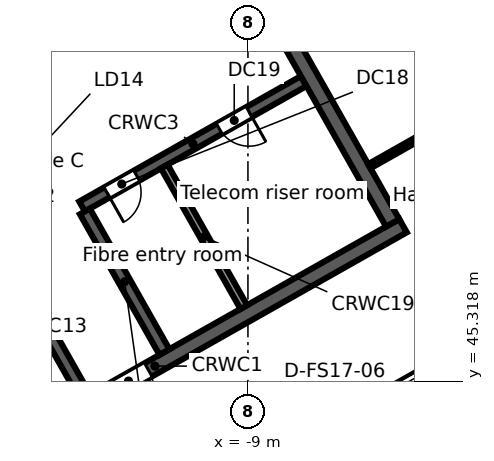
"""IFC4 building model, lengths in metres.
Left out: names, types, materials, properties, quantities, classifications, styles, units other than length and angle.
Written with IfcOpenShell. Run it as: python <this file> out.ifc"""

import sys

from ifc_helpers import new_model, si_unit, direction, frame, frame_2d, origin, place, context, subcontext, project, spatial, rectangle, extrude, element, fill, save


model = new_model("IFC4")
c1 = context("Model", 3, precision=1e-05, world=origin(), true_north=direction((0.0, 1.0)))
c2 = subcontext(c1, "Body", "Model", "MODEL_VIEW")
j1 = project(units=[si_unit("LENGTHUNIT", "METRE"), si_unit("PLANEANGLEUNIT", "RADIAN")], contexts=[c1])
p1 = place(None, origin())
s1 = spatial("IfcSite", under=j1, at=p1, CompositionType="ELEMENT")
p2 = place(p1, origin())
s2 = spatial("IfcBuilding", under=s1, at=p2, CompositionType="ELEMENT")
p3 = place(p2, frame((0.0, 0.0, 262.7)))
s3 = spatial("IfcBuildingStorey", under=s2, at=p3, CompositionType="ELEMENT", Elevation=262.7)
p4 = place(p3, frame((-58.732, 38.771, 0.0), z_axis=(0.0, 0.0, 1.0), x_axis=(0.870355615581, 0.492423702137, 0.0)))
e1 = element("IfcWall", 1, at=p4, inside=s3, PredefinedType="STANDARD", context=c2, shape_type="SweptSolid", body=[
    extrude(rectangle(XDim=64.052, YDim=0.25, at=frame_2d((32.026, 0.0))), origin(), (0.0, 0.0, 1.0), 3.52),
])
p5 = place(p4, frame((61.259, 0.0, 0.8)))
e2 = element("IfcOpeningElement", 2, at=p5, cuts=e1, PredefinedType="OPENING", context=c2, shape_type="SweptSolid", body=[
    extrude(rectangle(XDim=2.4, YDim=2.2, at=frame_2d((1.2, 1.1))), frame((0.0, 0.135, 0.0), z_axis=(0.0, -1.0, 0.0), x_axis=(1.0, 0.0, 0.0)), (0.0, 0.0, 1.0), 0.27),
])
p6 = place(p4, frame((58.216, 0.0, 0.8)))
e3 = element("IfcOpeningElement", 3, at=p6, cuts=e1, PredefinedType="OPENING", context=c2, shape_type="SweptSolid", body=[
    extrude(rectangle(XDim=2.4, YDim=2.2, at=frame_2d((1.2, 1.1))), frame((0.0, 0.135, 0.0), z_axis=(0.0, -1.0, 0.0), x_axis=(1.0, 0.0, 0.0)), (0.0, 0.0, 1.0), 0.27),
])
p7 = place(p4, frame((55.173, 0.0, 0.8)))
e4 = element("IfcOpeningElement", 4, at=p7, cuts=e1, PredefinedType="OPENING", context=c2, shape_type="SweptSolid", body=[
    extrude(rectangle(XDim=2.4, YDim=2.2, at=frame_2d((1.2, 1.1))), frame((0.0, 0.135, 0.0), z_axis=(0.0, -1.0, 0.0), x_axis=(1.0, 0.0, 0.0)), (0.0, 0.0, 1.0), 0.27),
])
p8 = place(p4, frame((52.129, 0.0, 0.8)))
e5 = element("IfcOpeningElement", 5, at=p8, cuts=e1, PredefinedType="OPENING", context=c2, shape_type="SweptSolid", body=[
    extrude(rectangle(XDim=2.4, YDim=2.2, at=frame_2d((1.2, 1.1))), frame((0.0, 0.135, 0.0), z_axis=(0.0, -1.0, 0.0), x_axis=(1.0, 0.0, 0.0)), (0.0, 0.0, 1.0), 0.27),
])
p9 = place(p4, frame((49.086, 0.0, 0.8)))
e6 = element("IfcOpeningElement", 6, at=p9, cuts=e1, PredefinedType="OPENING", context=c2, shape_type="SweptSolid", body=[
    extrude(rectangle(XDim=2.4, YDim=2.2, at=frame_2d((1.2, 1.1))), frame((0.0, 0.135, 0.0), z_axis=(0.0, -1.0, 0.0), x_axis=(1.0, 0.0, 0.0)), (0.0, 0.0, 1.0), 0.27),
])
p10 = place(p4, frame((46.043, 0.0, 0.8)))
e7 = element("IfcOpeningElement", 7, at=p10, cuts=e1, PredefinedType="OPENING", context=c2, shape_type="SweptSolid", body=[
    extrude(rectangle(XDim=2.4, YDim=2.2, at=frame_2d((1.2, 1.1))), frame((0.0, 0.135, 0.0), z_axis=(0.0, -1.0, 0.0), x_axis=(1.0, 0.0, 0.0)), (0.0, 0.0, 1.0), 0.27),
])
p11 = place(p4, frame((43.0, 0.0, 0.8)))
e8 = element("IfcOpeningElement", 8, at=p11, cuts=e1, PredefinedType="OPENING", context=c2, shape_type="SweptSolid", body=[
    extrude(rectangle(XDim=2.4, YDim=2.2, at=frame_2d((1.2, 1.1))), frame((0.0, 0.135, 0.0), z_axis=(0.0, -1.0, 0.0), x_axis=(1.0, 0.0, 0.0)), (0.0, 0.0, 1.0), 0.27),
])
p12 = place(p4, frame((39.956, 0.0, 0.8)))
e9 = element("IfcOpeningElement", 9, at=p12, cuts=e1, PredefinedType="OPENING", context=c2, shape_type="SweptSolid", body=[
    extrude(rectangle(XDim=2.4, YDim=2.2, at=frame_2d((1.2, 1.1))), frame((0.0, 0.135, 0.0), z_axis=(0.0, -1.0, 0.0), x_axis=(1.0, 0.0, 0.0)), (0.0, 0.0, 1.0), 0.27),
])
p13 = place(p4, frame((36.913, 0.0, 0.8)))
e10 = element("IfcOpeningElement", 10, at=p13, cuts=e1, PredefinedType="OPENING", context=c2, shape_type="SweptSolid", body=[
    extrude(rectangle(XDim=2.4, YDim=2.2, at=frame_2d((1.2, 1.1))), frame((0.0, 0.135, 0.0), z_axis=(0.0, -1.0, 0.0), x_axis=(1.0, 0.0, 0.0)), (0.0, 0.0, 1.0), 0.27),
])
p14 = place(p4, frame((33.87, 0.0, 0.8)))
e11 = element("IfcOpeningElement", 11, at=p14, cuts=e1, PredefinedType="OPENING", context=c2, shape_type="SweptSolid", body=[
    extrude(rectangle(XDim=2.4, YDim=2.2, at=frame_2d((1.2, 1.1))), frame((0.0, 0.135, 0.0), z_axis=(0.0, -1.0, 0.0), x_axis=(1.0, 0.0, 0.0)), (0.0, 0.0, 1.0), 0.27),
])
p15 = place(p4, frame((30.826, 0.0, 0.8)))
e12 = element("IfcOpeningElement", 12, at=p15, cuts=e1, PredefinedType="OPENING", context=c2, shape_type="SweptSolid", body=[
    extrude(rectangle(XDim=2.4, YDim=2.2, at=frame_2d((1.2, 1.1))), frame((0.0, 0.135, 0.0), z_axis=(0.0, -1.0, 0.0), x_axis=(1.0, 0.0, 0.0)), (0.0, 0.0, 1.0), 0.27),
])
p16 = place(p4, frame((27.783, 0.0, 0.8)))
e13 = element("IfcOpeningElement", 13, at=p16, cuts=e1, PredefinedType="OPENING", context=c2, shape_type="SweptSolid", body=[
    extrude(rectangle(XDim=2.4, YDim=2.2, at=frame_2d((1.2, 1.1))), frame((0.0, 0.135, 0.0), z_axis=(0.0, -1.0, 0.0), x_axis=(1.0, 0.0, 0.0)), (0.0, 0.0, 1.0), 0.27),
])
p17 = place(p4, frame((24.74, 0.0, 0.8)))
e14 = element("IfcOpeningElement", 14, at=p17, cuts=e1, PredefinedType="OPENING", context=c2, shape_type="SweptSolid", body=[
    extrude(rectangle(XDim=2.4, YDim=2.2, at=frame_2d((1.2, 1.1))), frame((0.0, 0.135, 0.0), z_axis=(0.0, -1.0, 0.0), x_axis=(1.0, 0.0, 0.0)), (0.0, 0.0, 1.0), 0.27),
])
p18 = place(p4, frame((21.696, 0.0, 0.8)))
e15 = element("IfcOpeningElement", 15, at=p18, cuts=e1, PredefinedType="OPENING", context=c2, shape_type="SweptSolid", body=[
    extrude(rectangle(XDim=2.4, YDim=2.2, at=frame_2d((1.2, 1.1))), frame((0.0, 0.135, 0.0), z_axis=(0.0, -1.0, 0.0), x_axis=(1.0, 0.0, 0.0)), (0.0, 0.0, 1.0), 0.27),
])
p19 = place(p4, frame((18.653, 0.0, 0.8)))
e16 = element("IfcOpeningElement", 16, at=p19, cuts=e1, PredefinedType="OPENING", context=c2, shape_type="SweptSolid", body=[
    extrude(rectangle(XDim=2.4, YDim=2.2, at=frame_2d((1.2, 1.1))), frame((0.0, 0.135, 0.0), z_axis=(0.0, -1.0, 0.0), x_axis=(1.0, 0.0, 0.0)), (0.0, 0.0, 1.0), 0.27),
])
p20 = place(p4, frame((15.61, 0.0, 0.8)))
e17 = element("IfcOpeningElement", 17, at=p20, cuts=e1, PredefinedType="OPENING", context=c2, shape_type="SweptSolid", body=[
    extrude(rectangle(XDim=2.4, YDim=2.2, at=frame_2d((1.2, 1.1))), frame((0.0, 0.135, 0.0), z_axis=(0.0, -1.0, 0.0), x_axis=(1.0, 0.0, 0.0)), (0.0, 0.0, 1.0), 0.27),
])
p21 = place(p4, frame((12.567, 0.0, 0.8)))
e18 = element("IfcOpeningElement", 18, at=p21, cuts=e1, PredefinedType="OPENING", context=c2, shape_type="SweptSolid", body=[
    extrude(rectangle(XDim=2.4, YDim=2.2, at=frame_2d((1.2, 1.1))), frame((0.0, 0.135, 0.0), z_axis=(0.0, -1.0, 0.0), x_axis=(1.0, 0.0, 0.0)), (0.0, 0.0, 1.0), 0.27),
])
p22 = place(p4, frame((9.523, 0.0, 0.8)))
e19 = element("IfcOpeningElement", 19, at=p22, cuts=e1, PredefinedType="OPENING", context=c2, shape_type="SweptSolid", body=[
    extrude(rectangle(XDim=2.4, YDim=2.2, at=frame_2d((1.2, 1.1))), frame((0.0, 0.135, 0.0), z_axis=(0.0, -1.0, 0.0), x_axis=(1.0, 0.0, 0.0)), (0.0, 0.0, 1.0), 0.27),
])
p23 = place(p4, frame((6.48, 0.0, 0.8)))
e20 = element("IfcOpeningElement", 20, at=p23, cuts=e1, PredefinedType="OPENING", context=c2, shape_type="SweptSolid", body=[
    extrude(rectangle(XDim=2.4, YDim=2.2, at=frame_2d((1.2, 1.1))), frame((0.0, 0.135, 0.0), z_axis=(0.0, -1.0, 0.0), x_axis=(1.0, 0.0, 0.0)), (0.0, 0.0, 1.0), 0.27),
])
p24 = place(p4, frame((3.437, 0.0, 0.8)))
e21 = element("IfcOpeningElement", 21, at=p24, cuts=e1, PredefinedType="OPENING", context=c2, shape_type="SweptSolid", body=[
    extrude(rectangle(XDim=2.4, YDim=2.2, at=frame_2d((1.2, 1.1))), frame((0.0, 0.135, 0.0), z_axis=(0.0, -1.0, 0.0), x_axis=(1.0, 0.0, 0.0)), (0.0, 0.0, 1.0), 0.27),
])
p25 = place(p4, frame((0.393, 0.0, 0.8)))
e22 = element("IfcOpeningElement", 22, at=p25, cuts=e1, PredefinedType="OPENING", context=c2, shape_type="SweptSolid", body=[
    extrude(rectangle(XDim=2.4, YDim=2.2, at=frame_2d((1.2, 1.1))), frame((0.0, 0.135, 0.0), z_axis=(0.0, -1.0, 0.0), x_axis=(1.0, 0.0, 0.0)), (0.0, 0.0, 1.0), 0.27),
])
p26 = place(p3, frame((-3.017, 46.293, 0.0), z_axis=(0.0, 0.0, 1.0), x_axis=(-0.870355474887, -0.492423950812, 0.0)))
e23 = element("IfcWall", 23, at=p26, inside=s3, PredefinedType="STANDARD", context=c2, shape_type="SweptSolid", body=[
    extrude(rectangle(XDim=40.34, YDim=0.25, at=frame_2d((20.17, 0.0))), origin(), (0.0, 0.0, 1.0), 3.52),
])
p27 = place(p26, frame((37.428, 0.0, 0.8)))
e24 = element("IfcOpeningElement", 24, at=p27, cuts=e23, PredefinedType="OPENING", context=c2, shape_type="SweptSolid", body=[
    extrude(rectangle(XDim=2.4, YDim=2.2, at=frame_2d((1.2, 1.1))), frame((0.0, 0.135, 0.0), z_axis=(0.0, -1.0, 0.0), x_axis=(1.0, 0.0, 0.0)), (0.0, 0.0, 1.0), 0.27),
])
p28 = place(p26, frame((34.372, 0.0, 0.0)))
e25 = element("IfcOpeningElement", 25, at=p28, cuts=e23, PredefinedType="OPENING", context=c2, shape_type="SweptSolid", body=[
    extrude(rectangle(XDim=1.8, YDim=2.4, at=frame_2d((0.9, 1.2))), frame((0.0, 0.135, 0.0), z_axis=(0.0, -1.0, 0.0), x_axis=(1.0, 0.0, 0.0)), (0.0, 0.0, 1.0), 0.27),
])
p29 = place(p26, frame((30.716, 0.0, 0.8)))
e26 = element("IfcOpeningElement", 26, at=p29, cuts=e23, PredefinedType="OPENING", context=c2, shape_type="SweptSolid", body=[
    extrude(rectangle(XDim=2.4, YDim=2.2, at=frame_2d((1.2, 1.1))), frame((0.0, 0.135, 0.0), z_axis=(0.0, -1.0, 0.0), x_axis=(1.0, 0.0, 0.0)), (0.0, 0.0, 1.0), 0.27),
])
p30 = place(p26, frame((27.36, 0.0, 0.8)))
e27 = element("IfcOpeningElement", 27, at=p30, cuts=e23, PredefinedType="OPENING", context=c2, shape_type="SweptSolid", body=[
    extrude(rectangle(XDim=2.4, YDim=2.2, at=frame_2d((1.2, 1.1))), frame((0.0, 0.135, 0.0), z_axis=(0.0, -1.0, 0.0), x_axis=(1.0, 0.0, 0.0)), (0.0, 0.0, 1.0), 0.27),
])
p31 = place(p26, frame((24.304, 0.0, 0.0)))
e28 = element("IfcOpeningElement", 28, at=p31, cuts=e23, PredefinedType="OPENING", context=c2, shape_type="SweptSolid", body=[
    extrude(rectangle(XDim=1.8, YDim=2.4, at=frame_2d((0.9, 1.2))), frame((0.0, 0.135, 0.0), z_axis=(0.0, -1.0, 0.0), x_axis=(1.0, 0.0, 0.0)), (0.0, 0.0, 1.0), 0.27),
])
p32 = place(p26, frame((20.648, 0.0, 0.8)))
e29 = element("IfcOpeningElement", 29, at=p32, cuts=e23, PredefinedType="OPENING", context=c2, shape_type="SweptSolid", body=[
    extrude(rectangle(XDim=2.4, YDim=2.2, at=frame_2d((1.2, 1.1))), frame((0.0, 0.135, 0.0), z_axis=(0.0, -1.0, 0.0), x_axis=(1.0, 0.0, 0.0)), (0.0, 0.0, 1.0), 0.27),
])
p33 = place(p26, frame((17.292, 0.0, 0.8)))
e30 = element("IfcOpeningElement", 30, at=p33, cuts=e23, PredefinedType="OPENING", context=c2, shape_type="SweptSolid", body=[
    extrude(rectangle(XDim=2.4, YDim=2.2, at=frame_2d((1.2, 1.1))), frame((0.0, 0.135, 0.0), z_axis=(0.0, -1.0, 0.0), x_axis=(1.0, 0.0, 0.0)), (0.0, 0.0, 1.0), 0.27),
])
p34 = place(p26, frame((14.236, 0.0, 0.0)))
e31 = element("IfcOpeningElement", 31, at=p34, cuts=e23, PredefinedType="OPENING", context=c2, shape_type="SweptSolid", body=[
    extrude(rectangle(XDim=1.8, YDim=2.4, at=frame_2d((0.9, 1.2))), frame((0.0, 0.135, 0.0), z_axis=(0.0, -1.0, 0.0), x_axis=(1.0, 0.0, 0.0)), (0.0, 0.0, 1.0), 0.27),
])
p35 = place(p26, frame((10.58, 0.0, 0.8)))
e32 = element("IfcOpeningElement", 32, at=p35, cuts=e23, PredefinedType="OPENING", context=c2, shape_type="SweptSolid", body=[
    extrude(rectangle(XDim=2.4, YDim=2.2, at=frame_2d((1.2, 1.1))), frame((0.0, 0.135, 0.0), z_axis=(0.0, -1.0, 0.0), x_axis=(1.0, 0.0, 0.0)), (0.0, 0.0, 1.0), 0.27),
])
p36 = place(p26, frame((7.224, 0.0, 0.8)))
e33 = element("IfcOpeningElement", 33, at=p36, cuts=e23, PredefinedType="OPENING", context=c2, shape_type="SweptSolid", body=[
    extrude(rectangle(XDim=2.4, YDim=2.2, at=frame_2d((1.2, 1.1))), frame((0.0, 0.135, 0.0), z_axis=(0.0, -1.0, 0.0), x_axis=(1.0, 0.0, 0.0)), (0.0, 0.0, 1.0), 0.27),
])
p37 = place(p26, frame((4.168, 0.0, 0.0)))
e34 = element("IfcOpeningElement", 34, at=p37, cuts=e23, PredefinedType="OPENING", context=c2, shape_type="SweptSolid", body=[
    extrude(rectangle(XDim=1.8, YDim=2.4, at=frame_2d((0.9, 1.2))), frame((0.0, 0.135, 0.0), z_axis=(0.0, -1.0, 0.0), x_axis=(1.0, 0.0, 0.0)), (0.0, 0.0, 1.0), 0.27),
])
p38 = place(p26, frame((0.512, 0.0, 0.8)))
e35 = element("IfcOpeningElement", 35, at=p38, cuts=e23, PredefinedType="OPENING", context=c2, shape_type="SweptSolid", body=[
    extrude(rectangle(XDim=2.4, YDim=2.2, at=frame_2d((1.2, 1.1))), frame((0.0, 0.135, 0.0), z_axis=(0.0, -1.0, 0.0), x_axis=(1.0, 0.0, 0.0)), (0.0, 0.0, 1.0), 0.27),
])
p39 = place(p3, frame((-17.975, 42.017, 0.0), z_axis=(0.0, 0.0, 1.0), x_axis=(0.87034965173, 0.492434243055, 0.0)))
e36 = element("IfcWall", 36, at=p39, inside=s3, PredefinedType="SOLIDWALL", context=c2, shape_type="SweptSolid", body=[
    extrude(rectangle(XDim=15.0, YDim=0.4, at=frame_2d((7.5, 0.0))), origin(), (0.0, 0.0, 1.0), 3.52),
])
p40 = place(p39, frame((6.1, 0.0, 0.0)))
e37 = element("IfcOpeningElement", 37, at=p40, cuts=e36, PredefinedType="OPENING", context=c2, shape_type="SweptSolid", body=[
    extrude(rectangle(XDim=1.2, YDim=2.1, at=frame_2d((0.6, 1.05))), frame((0.0, 0.21, 0.0), z_axis=(0.0, -1.0, 0.0), x_axis=(1.0, 0.0, 0.0)), (0.0, 0.0, 1.0), 0.42),
])
p41 = place(p3, frame((-13.365, 49.911, 0.0), z_axis=(0.0, 0.0, 1.0), x_axis=(0.870347618718, 0.492437836272, 0.0)))
e38 = element("IfcWall", 38, at=p41, inside=s3, PredefinedType="SOLIDWALL", context=c2, shape_type="SweptSolid", body=[
    extrude(rectangle(XDim=6.7, YDim=0.3, at=frame_2d((3.35, 0.0))), origin(), (0.0, 0.0, 1.0), 3.52),
])
p42 = place(p41, frame((0.75, 0.0, 0.0)))
e39 = element("IfcOpeningElement", 39, at=p42, cuts=e38, PredefinedType="OPENING", context=c2, shape_type="SweptSolid", body=[
    extrude(rectangle(XDim=0.9, YDim=2.1, at=frame_2d((0.45, 1.05))), frame((0.0, 0.16, 0.0), z_axis=(0.0, -1.0, 0.0), x_axis=(1.0, 0.0, 0.0)), (0.0, 0.0, 1.0), 0.32),
])
p43 = place(p41, frame((4.15, 0.0, 0.0)))
e40 = element("IfcOpeningElement", 40, at=p43, cuts=e38, PredefinedType="OPENING", context=c2, shape_type="SweptSolid", body=[
    extrude(rectangle(XDim=0.9, YDim=2.1, at=frame_2d((0.45, 1.05))), frame((0.0, 0.16, 0.0), z_axis=(0.0, -1.0, 0.0), x_axis=(1.0, 0.0, 0.0)), (0.0, 0.0, 1.0), 0.32),
])
p44 = place(p3, frame((-15.618, 53.691, 0.0), z_axis=(0.0, 0.0, 1.0), x_axis=(0.870362830851, 0.492410948978, 0.0)))
e41 = element("IfcWall", 41, at=p44, inside=s3, PredefinedType="SOLIDWALL", context=c2, shape_type="SweptSolid", body=[
    extrude(rectangle(XDim=6.8, YDim=0.3, at=frame_2d((3.4, 0.0))), origin(), (0.0, 0.0, 1.0), 3.52),
])
p45 = place(p3, frame((-24.672, 53.854, 0.0), z_axis=(0.0, 0.0, 1.0), x_axis=(0.870353598469, 0.492427267353, 0.0)))
e42 = element("IfcWall", 42, at=p45, inside=s3, PredefinedType="SOLIDWALL", context=c2, shape_type="SweptSolid", body=[
    extrude(rectangle(XDim=15.0, YDim=0.4, at=frame_2d((7.5, 0.0))), origin(), (0.0, 0.0, 1.0), 3.52),
])
p46 = place(p3, frame((-15.379, 48.599, 0.0), z_axis=(0.0, 0.0, 1.0), x_axis=(0.492422543467, -0.870356271124, 0.0)))
e43 = element("IfcWall", 43, at=p46, inside=s3, PredefinedType="SOLIDWALL", context=c2, shape_type="SweptSolid", body=[
    extrude(rectangle(XDim=4.25, YDim=0.3, at=frame_2d((2.125, 0.0))), origin(), (0.0, 0.0, 1.0), 3.52),
])
p47 = place(p3, frame((-13.291, 49.781, 0.0), z_axis=(0.0, 0.0, 1.0), x_axis=(0.492397924348, -0.870370199454, 0.0)))
e44 = element("IfcWall", 44, at=p47, inside=s3, PredefinedType="SOLIDWALL", context=c2, shape_type="SweptSolid", body=[
    extrude(rectangle(XDim=4.25, YDim=0.3, at=frame_2d((2.125, 0.0))), origin(), (0.0, 0.0, 1.0), 3.52),
])
p48 = place(p3, frame((-11.202, 50.962, 0.0), z_axis=(0.0, 0.0, 1.0), x_axis=(0.492441437811, -0.870345580977, 0.0)))
e45 = element("IfcWall", 45, at=p48, inside=s3, PredefinedType="PARTITIONING", context=c2, shape_type="SweptSolid", body=[
    extrude(rectangle(XDim=4.25, YDim=0.2, at=frame_2d((2.125, 0.0))), origin(), (0.0, 0.0, 1.0), 3.52),
])
p49 = place(p3, frame((-11.692, 60.968, 0.0), z_axis=(0.0, 0.0, 1.0), x_axis=(0.492421663121, -0.870356769198, 0.0)))
e46 = element("IfcWall", 46, at=p49, inside=s3, PredefinedType="SOLIDWALL", context=c2, shape_type="SweptSolid", body=[
    extrude(rectangle(XDim=13.2, YDim=0.4, at=frame_2d((6.6, 0.0))), origin(), (0.0, 0.0, 1.0), 3.52),
])
p50 = place(p3, frame((-5.806, 50.97, 0.0), z_axis=(0.0, 0.0, 1.0), x_axis=(0.870355163327, 0.492424501492, 0.0)))
e47 = element("IfcWall", 47, at=p50, inside=s3, PredefinedType="PARTITIONING", context=c2, shape_type="SweptSolid", body=[
    extrude(rectangle(XDim=6.527, YDim=0.125, at=frame_2d((3.264, 0.0))), origin(), (0.0, 0.0, 1.0), 2.8),
])
p51 = place(p50, frame((2.7, 0.0, 0.0)))
e48 = element("IfcOpeningElement", 48, at=p51, cuts=e47, PredefinedType="OPENING", context=c2, shape_type="SweptSolid", body=[
    extrude(rectangle(XDim=0.9, YDim=2.1, at=frame_2d((0.45, 1.05))), frame((0.0, 0.073, 0.0), z_axis=(0.0, -1.0, 0.0), x_axis=(1.0, 0.0, 0.0)), (0.0, 0.0, 1.0), 0.145),
])
p52 = place(p38, origin())
e49 = element("IfcWindow", 49, at=p52, inside=s3, PartitioningType="SINGLE_PANEL", PredefinedType="WINDOW", context=c2, shape_type="SweptSolid", body=[
    extrude(rectangle(XDim=2.4, YDim=2.2, at=frame_2d((1.2, 1.1))), frame((0.0, 0.03, 0.0), z_axis=(0.0, -1.0, 0.0), x_axis=(1.0, 0.0, 0.0)), (0.0, 0.0, 1.0), 0.06),
])
fill(e35, e49)
p53 = place(p40, frame((1.2, 0.0, 0.0), z_axis=(0.0, 0.0, 1.0), x_axis=(-1.0, 0.0, 0.0)))
e50 = element("IfcDoor", 50, at=p53, inside=s3, OperationType="SINGLE_SWING_RIGHT", PredefinedType="DOOR", context=c2, shape_type="SweptSolid", body=[
    extrude(rectangle(XDim=1.2, YDim=2.1, at=frame_2d((0.6, 1.05))), frame((0.0, 0.025, 0.0), z_axis=(0.0, -1.0, 0.0), x_axis=(1.0, 0.0, 0.0)), (0.0, 0.0, 1.0), 0.05),
])
fill(e37, e50)
p54 = place(p42, frame((0.9, 0.0, 0.0), z_axis=(0.0, 0.0, 1.0), x_axis=(-1.0, 0.0, 0.0)))
e51 = element("IfcDoor", 51, at=p54, inside=s3, OperationType="SINGLE_SWING_RIGHT", PredefinedType="DOOR", context=c2, shape_type="SweptSolid", body=[
    extrude(rectangle(XDim=0.9, YDim=2.1, at=frame_2d((0.45, 1.05))), frame((0.0, 0.025, 0.0), z_axis=(0.0, -1.0, 0.0), x_axis=(1.0, 0.0, 0.0)), (0.0, 0.0, 1.0), 0.05),
])
fill(e39, e51)
p55 = place(p43, frame((0.9, 0.0, 0.0), z_axis=(0.0, 0.0, 1.0), x_axis=(-1.0, 0.0, 0.0)))
e52 = element("IfcDoor", 52, at=p55, inside=s3, OperationType="SINGLE_SWING_LEFT", PredefinedType="DOOR", context=c2, shape_type="SweptSolid", body=[
    extrude(rectangle(XDim=0.9, YDim=2.1, at=frame_2d((0.45, 1.05))), frame((0.0, 0.025, 0.0), z_axis=(0.0, -1.0, 0.0), x_axis=(1.0, 0.0, 0.0)), (0.0, 0.0, 1.0), 0.05),
])
fill(e40, e52)
save(model, sys.argv[1])
